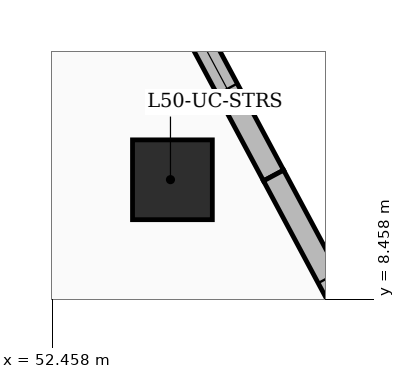
"""IFC4 building model, lengths in metres.
Left out: names, types, materials, properties, quantities, classifications, styles, units other than length and angle.
Written with IfcOpenShell. Run it as: python <this file> out.ifc"""

import sys

from ifc_helpers import new_model, si_unit, direction, frame, frame_2d, origin, origin_2d, place, context, subcontext, project, spatial, rectangle, extrude, element, fill, save


model = new_model("IFC4")
c1 = context("Model", 3, precision=1e-05, world=origin(), true_north=direction((0.0, 1.0)))
c2 = subcontext(c1, "Body", "Model", "MODEL_VIEW")
j1 = project(units=[si_unit("LENGTHUNIT", "METRE"), si_unit("PLANEANGLEUNIT", "RADIAN")], contexts=[c1])
p1 = place(None, origin())
s1 = spatial("IfcSite", under=j1, at=p1, CompositionType="ELEMENT")
p2 = place(p1, origin())
s2 = spatial("IfcBuilding", under=s1, at=p2, CompositionType="ELEMENT")
p3 = place(p2, frame((0.0, 0.0, 193.2)))
s3 = spatial("IfcBuildingStorey", under=s2, at=p3, CompositionType="ELEMENT", Elevation=193.2)
p4 = place(p3, frame((54.034, 10.034, 0.0), z_axis=(0.0, 0.0, 1.0), x_axis=(1.0, 0.0, 0.0)))
e1 = element("IfcColumn", 1, at=p4, inside=s3, PredefinedType="COLUMN", context=c2, shape_type="SweptSolid", body=[
    extrude(rectangle(XDim=1.05, YDim=1.05, at=origin_2d()), origin(), (0.0, 0.0, 1.0), 3.6),
])
p5 = place(p3, frame((52.882, 14.729, 0.0), z_axis=(0.0, 0.0, 1.0), x_axis=(0.47178229043, -0.881715073273, 0.0)))
e2 = element("IfcWall", 2, at=p5, inside=s3, PredefinedType="SOLIDWALL", context=c2, shape_type="SweptSolid", body=[
    extrude(rectangle(XDim=5.262, YDim=0.3, at=frame_2d((2.631, 0.0))), origin(), (0.0, 0.0, 1.0), 3.3),
])
p6 = place(p5, frame((2.77, 0.0, 0.8)))
e3 = element("IfcOpeningElement", 3, at=p6, cuts=e2, PredefinedType="OPENING", context=c2, shape_type="SweptSolid", body=[
    extrude(rectangle(XDim=1.2, YDim=1.8, at=frame_2d((0.6, 0.9))), frame((0.0, 0.16, 0.0), z_axis=(0.0, -1.0, 0.0), x_axis=(1.0, 0.0, 0.0)), (0.0, 0.0, 1.0), 0.32),
])
p7 = place(p5, frame((0.445, 0.0, 0.55)))
e4 = element("IfcOpeningElement", 4, at=p7, cuts=e2, PredefinedType="OPENING", context=c2, shape_type="SweptSolid", body=[
    extrude(rectangle(XDim=1.6, YDim=2.2, at=frame_2d((0.8, 1.1))), frame((0.0, 0.16, 0.0), z_axis=(0.0, -1.0, 0.0), x_axis=(1.0, 0.0, 0.0)), (0.0, 0.0, 1.0), 0.32),
])
p8 = place(p3, frame((55.365, 10.09, 0.0), z_axis=(0.0, 0.0, 1.0), x_axis=(0.471765361947, -0.881724131045, 0.0)))
e5 = element("IfcWall", 5, at=p8, inside=s3, PredefinedType="SOLIDWALL", context=c2, shape_type="SweptSolid", body=[
    extrude(rectangle(XDim=5.542, YDim=0.3, at=frame_2d((2.771, 0.0))), origin(), (0.0, 0.0, 1.0), 3.3),
])
p9 = place(p8, frame((1.525, 0.0, 0.6)))
e6 = element("IfcOpeningElement", 6, at=p9, cuts=e5, PredefinedType="OPENING", context=c2, shape_type="SweptSolid", body=[
    extrude(rectangle(XDim=1.5, YDim=2.1, at=frame_2d((0.75, 1.05))), frame((0.0, 0.16, 0.0), z_axis=(0.0, -1.0, 0.0), x_axis=(1.0, 0.0, 0.0)), (0.0, 0.0, 1.0), 0.32),
])
p10 = place(p6, origin())
e7 = element("IfcWindow", 7, at=p10, inside=s3, PartitioningType="SINGLE_PANEL", PredefinedType="WINDOW", context=c2, shape_type="SweptSolid", body=[
    extrude(rectangle(XDim=1.2, YDim=1.8, at=frame_2d((0.6, 0.9))), frame((0.0, 0.03, 0.0), z_axis=(0.0, -1.0, 0.0), x_axis=(1.0, 0.0, 0.0)), (0.0, 0.0, 1.0), 0.06),
])
fill(e3, e7)
save(model, sys.argv[1])
